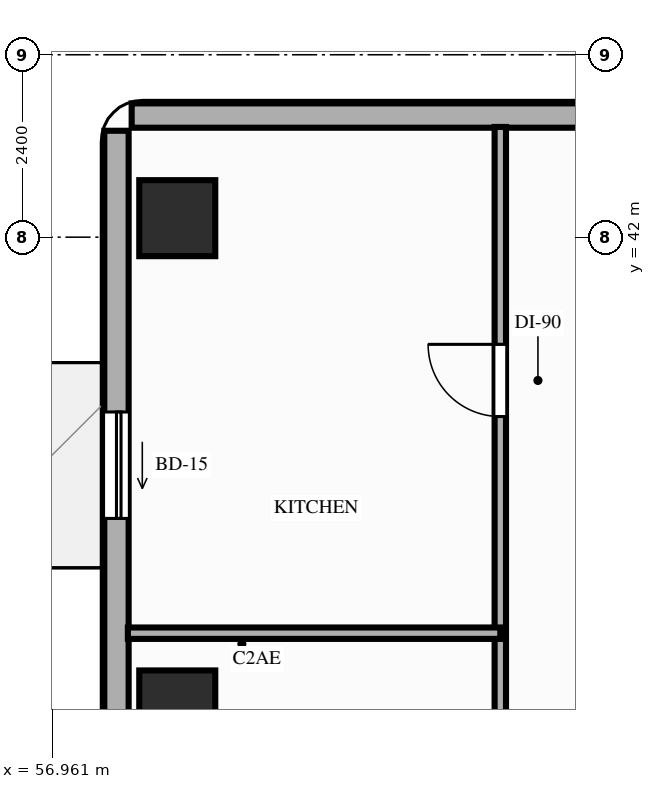
"""IFC4 building model, lengths in metres.
Left out: names, types, materials, properties, quantities, classifications, styles, units other than length and angle.
Written with IfcOpenShell. Run it as: python <this file> out.ifc"""

import sys

from ifc_helpers import new_model, si_unit, direction, frame, frame_2d, origin, origin_2d, place, context, subcontext, project, spatial, rectangle, extrude, element, fill, save


model = new_model("IFC4")
c1 = context("Model", 3, precision=1e-05, world=origin(), true_north=direction((0.0, 1.0)))
c2 = subcontext(c1, "Body", "Model", "MODEL_VIEW")
j1 = project(units=[si_unit("LENGTHUNIT", "METRE"), si_unit("PLANEANGLEUNIT", "RADIAN")], contexts=[c1])
p1 = place(None, origin())
s1 = spatial("IfcSite", under=j1, at=p1, CompositionType="ELEMENT")
p2 = place(p1, origin())
s2 = spatial("IfcBuilding", under=s1, at=p2, CompositionType="ELEMENT")
p3 = place(p2, frame((0.0, 0.0, 30.2)))
s3 = spatial("IfcBuildingStorey", under=s2, at=p3, CompositionType="ELEMENT", Elevation=30.2)
for number, where, z_axis, x_axis in (
    (1, (58.6, 35.8, 0.0), (0.0, 0.0, 1.0), (1.0, 0.0, 0.0)),
    (2, (58.6, 42.25, 0.0), (0.0, 0.0, 1.0), (1.0, 0.0, 0.0)),
):
    element("IfcColumn", number, at=place(p3, frame(where, z_axis=z_axis, x_axis=x_axis)), inside=s3, PredefinedType="COLUMN", context=c2, shape_type="SweptSolid", body=[
        extrude(rectangle(XDim=1.0, YDim=1.0, at=origin_2d()), origin(), (0.0, 0.0, 1.0), 3.2),
    ])
p4 = place(p3, frame((57.8, 43.4, 0.0), z_axis=(0.0, 0.0, 1.0), x_axis=(0.0, -1.0, 0.0)))
e3 = element("IfcWall", 3, at=p4, inside=s3, PredefinedType="STANDARD", context=c2, shape_type="SweptSolid", body=[
    extrude(rectangle(XDim=22.6, YDim=0.32, at=frame_2d((11.3, 0.0))), origin(), (0.0, 0.0, 1.0), 2.5),
])
p5 = place(p4, frame((3.7, 0.0, 0.0)))
e4 = element("IfcOpeningElement", 4, at=p5, cuts=e3, PredefinedType="OPENING", context=c2, shape_type="SweptSolid", body=[
    extrude(rectangle(XDim=1.4, YDim=2.1, at=frame_2d((0.7, 1.05))), frame((0.0, 0.17, 0.0), z_axis=(0.0, -1.0, 0.0), x_axis=(1.0, 0.0, 0.0)), (0.0, 0.0, 1.0), 0.34),
])
p6 = place(p3, frame((72.8, 43.6, 0.0), z_axis=(0.0, 0.0, 1.0), x_axis=(-1.0, 0.0, 0.0)))
e5 = element("IfcWall", 5, at=p6, inside=s3, PredefinedType="STANDARD", context=c2, shape_type="SweptSolid", body=[
    extrude(rectangle(XDim=14.8, YDim=0.32, at=frame_2d((7.4, 0.0))), origin(), (0.0, 0.0, 1.0), 3.02),
])
p7 = place(p3, frame((62.85, 20.75, 0.0), z_axis=(0.0, 0.0, 1.0), x_axis=(0.0, 1.0, 0.0)))
e6 = element("IfcWall", 6, at=p7, inside=s3, PredefinedType="PARTITIONING", context=c2, shape_type="SweptSolid", body=[
    extrude(rectangle(XDim=22.7, YDim=0.15, at=frame_2d((11.35, 0.0))), origin(), (0.0, 0.0, 1.0), 2.5),
])
p8 = place(p7, frame((0.73, 0.0, 0.0)))
e7 = element("IfcOpeningElement", 7, at=p8, cuts=e6, PredefinedType="OPENING", context=c2, shape_type="SweptSolid", body=[
    extrude(rectangle(XDim=0.85, YDim=2.1, at=frame_2d((0.425, 1.05))), frame((0.0, 0.085, 0.0), z_axis=(0.0, -1.0, 0.0), x_axis=(1.0, 0.0, 0.0)), (0.0, 0.0, 1.0), 0.17),
])
p9 = place(p7, frame((3.43, 0.0, 0.0)))
e8 = element("IfcOpeningElement", 8, at=p9, cuts=e6, PredefinedType="OPENING", context=c2, shape_type="SweptSolid", body=[
    extrude(rectangle(XDim=0.95, YDim=2.1, at=frame_2d((0.475, 1.05))), frame((0.0, 0.085, 0.0), z_axis=(0.0, -1.0, 0.0), x_axis=(1.0, 0.0, 0.0)), (0.0, 0.0, 1.0), 0.17),
])
p10 = place(p7, frame((8.15, 0.0, 0.0)))
e9 = element("IfcOpeningElement", 9, at=p10, cuts=e6, PredefinedType="OPENING", context=c2, shape_type="SweptSolid", body=[
    extrude(rectangle(XDim=0.95, YDim=2.15, at=frame_2d((0.475, 1.075))), frame((0.0, 0.085, 0.0), z_axis=(0.0, -1.0, 0.0), x_axis=(1.0, 0.0, 0.0)), (0.0, 0.0, 1.0), 0.17),
])
p11 = place(p7, frame((18.89, 0.0, 0.0)))
e10 = element("IfcOpeningElement", 10, at=p11, cuts=e6, PredefinedType="OPENING", context=c2, shape_type="SweptSolid", body=[
    extrude(rectangle(XDim=0.95, YDim=2.15, at=frame_2d((0.475, 1.075))), frame((0.0, 0.085, 0.0), z_axis=(0.0, -1.0, 0.0), x_axis=(1.0, 0.0, 0.0)), (0.0, 0.0, 1.0), 0.17),
])
p12 = place(p3, frame((57.95, 36.79, 0.0), z_axis=(0.0, 0.0, 1.0), x_axis=(1.0, 0.0, 0.0)))
e11 = element("IfcWall", 11, at=p12, inside=s3, PredefinedType="PARTITIONING", context=c2, shape_type="SweptSolid", body=[
    extrude(rectangle(XDim=4.9, YDim=0.15, at=frame_2d((2.45, 0.0))), origin(), (0.0, 0.0, 1.0), 2.5),
])
p13 = place(p5, origin())
e12 = element("IfcDoor", 12, at=p13, inside=s3, OperationType="SLIDING_TO_RIGHT", PredefinedType="DOOR", context=c2, shape_type="SweptSolid", body=[
    extrude(rectangle(XDim=1.4, YDim=2.1, at=frame_2d((0.7, 1.05))), frame((0.0, 0.025, 0.0), z_axis=(0.0, -1.0, 0.0), x_axis=(1.0, 0.0, 0.0)), (0.0, 0.0, 1.0), 0.05),
])
fill(e4, e12)
p14 = place(p11, origin())
e13 = element("IfcDoor", 13, at=p14, inside=s3, OperationType="SINGLE_SWING_RIGHT", PredefinedType="DOOR", context=c2, shape_type="SweptSolid", body=[
    extrude(rectangle(XDim=0.95, YDim=2.15, at=frame_2d((0.475, 1.075))), frame((0.0, 0.025, 0.0), z_axis=(0.0, -1.0, 0.0), x_axis=(1.0, 0.0, 0.0)), (0.0, 0.0, 1.0), 0.05),
])
fill(e10, e13)
save(model, sys.argv[1])
